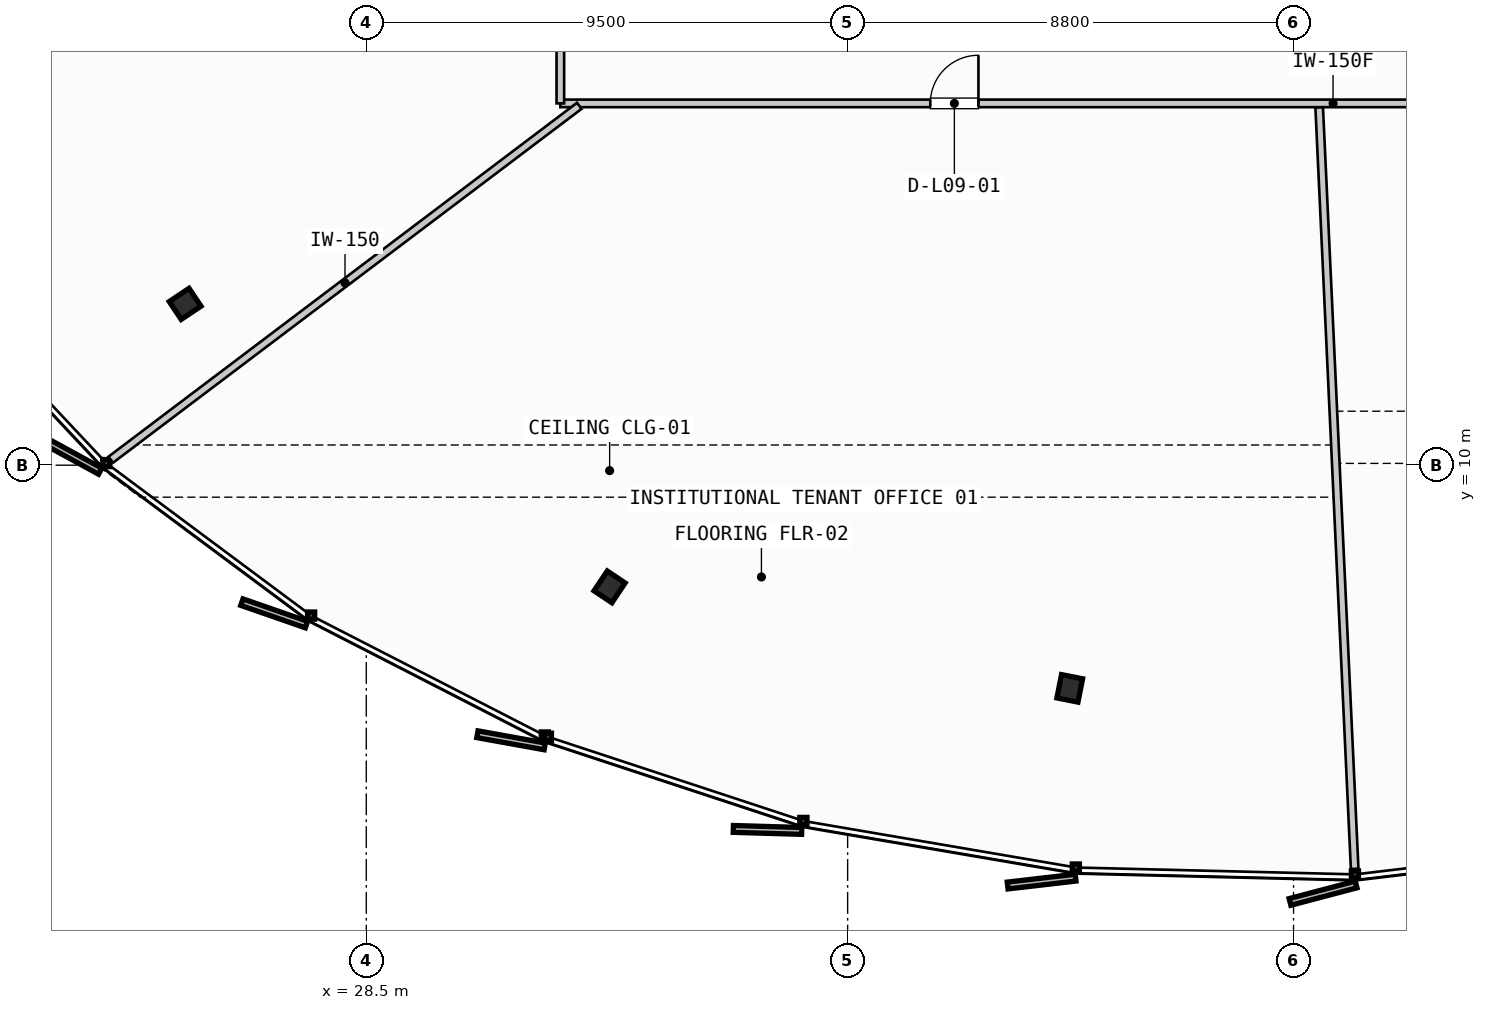
"""IFC4 building model, lengths in metres.
Left out: names, types, materials, properties, quantities, classifications, styles, units other than length and angle.
Written with IfcOpenShell. Run it as: python <this file> out.ifc"""

import sys

from ifc_helpers import new_model, si_unit, direction, frame, frame_2d, origin, origin_2d, place, context, subcontext, project, spatial, rectangle, i_section, extrude, source, transform, mapped, element, fill, save


model = new_model("IFC4")
c1 = context("Model", 3, precision=1e-05, world=origin(), true_north=direction((0.0, 1.0)))
c2 = subcontext(c1, "Body", "Model", "MODEL_VIEW")
j1 = project(units=[si_unit("LENGTHUNIT", "METRE"), si_unit("PLANEANGLEUNIT", "RADIAN")], contexts=[c1])
p1 = place(None, origin())
s1 = spatial("IfcSite", under=j1, at=p1, CompositionType="ELEMENT")
p2 = place(p1, origin())
s2 = spatial("IfcBuilding", under=s1, at=p2, CompositionType="ELEMENT")
p3 = place(p2, frame((0.0, 0.0, 41.0)))
s3 = spatial("IfcBuildingStorey", under=s2, at=p3, CompositionType="ELEMENT", Elevation=41.0)
m1 = source(origin(), c2, "Body", "SweptSolid", [
    extrude(i_section(OverallWidth=0.423, OverallDepth=0.469, WebThickness=0.051, FlangeThickness=0.081, FilletRadius=0.015, at=origin_2d()), origin(), (0.0, 0.0, 1.0), 3.55),
])
for number, where, z_axis, x_axis in (
    (1, (24.925, 13.183, 0.0), (0.0, 0.0, 1.0), (-0.831, -0.556, 0.0)),
    (2, (33.302, 7.599, 0.0), (0.0, 0.0, 1.0), (-0.556, -0.831, 0.0)),
    (3, (42.383, 5.596, 0.0), (0.0, 0.0, 1.0), (-0.195, -0.981, 0.0)),
):
    element("IfcColumn", number, at=place(p3, frame(where, z_axis=z_axis, x_axis=x_axis)), inside=s3, PredefinedType="COLUMN", context=c2, shape_type="MappedRepresentation", body=[
        mapped(m1, transform((0.0, 0.0, 0.0), scale=1.0)),
    ])
p4 = place(p3, frame((32.33, 17.14, 0.0), z_axis=(0.0, 0.0, 1.0), x_axis=(1.0, 0.0, 0.0)))
e4 = element("IfcWall", 4, at=p4, inside=s3, PredefinedType="PARTITIONING", context=c2, shape_type="SweptSolid", body=[
    extrude(rectangle(XDim=30.5, YDim=0.15, at=frame_2d((15.25, 0.0))), origin(), (0.0, 0.0, 1.0), 2.785),
])
p5 = place(p4, frame((7.302, 0.0, 0.0)))
e5 = element("IfcOpeningElement", 5, at=p5, cuts=e4, PredefinedType="OPENING", context=c2, shape_type="SweptSolid", body=[
    extrude(rectangle(XDim=0.95, YDim=2.15, at=frame_2d((0.475, 1.075))), frame((0.0, 0.085, 0.0), z_axis=(0.0, -1.0, 0.0), x_axis=(1.0, 0.0, 0.0)), (0.0, 0.0, 1.0), 0.17),
])
p6 = place(p4, frame((21.971, 0.0, 0.0)))
e6 = element("IfcOpeningElement", 6, at=p6, cuts=e4, PredefinedType="OPENING", context=c2, shape_type="SweptSolid", body=[
    extrude(rectangle(XDim=0.95, YDim=2.15, at=frame_2d((0.475, 1.075))), frame((0.0, 0.085, 0.0), z_axis=(0.0, -1.0, 0.0), x_axis=(1.0, 0.0, 0.0)), (0.0, 0.0, 1.0), 0.17),
])
p7 = place(p3, frame((32.33, 37.62, 0.0), z_axis=(0.0, 0.0, 1.0), x_axis=(0.0, -1.0, 0.0)))
e7 = element("IfcWall", 7, at=p7, inside=s3, PredefinedType="PARTITIONING", context=c2, shape_type="SweptSolid", body=[
    extrude(rectangle(XDim=20.48, YDim=0.15, at=frame_2d((10.24, 0.0))), origin(), (0.0, 0.0, 1.0), 2.785),
])
p8 = place(p7, frame((9.765, 0.0, 0.0)))
e8 = element("IfcOpeningElement", 8, at=p8, cuts=e7, PredefinedType="OPENING", context=c2, shape_type="SweptSolid", body=[
    extrude(rectangle(XDim=0.95, YDim=2.15, at=frame_2d((0.475, 1.075))), frame((0.0, 0.085, 0.0), z_axis=(0.0, -1.0, 0.0), x_axis=(1.0, 0.0, 0.0)), (0.0, 0.0, 1.0), 0.17),
])
p9 = place(p3, frame((32.704, 17.092, 0.0), z_axis=(0.0, 0.0, 1.0), x_axis=(-0.797998359946, -0.602659619954, 0.0)))
e9 = element("IfcWall", 9, at=p9, inside=s3, PredefinedType="PARTITIONING", context=c2, shape_type="SweptSolid", body=[
    extrude(rectangle(XDim=11.588, YDim=0.15, at=frame_2d((5.794, 0.0))), origin(), (0.0, 0.0, 1.0), 2.785),
])
p10 = place(p3, frame((47.306, 17.06, 0.0), z_axis=(0.0, 0.0, 1.0), x_axis=(0.046548778798, -0.998916018088, 0.0)))
e10 = element("IfcWall", 10, at=p10, inside=s3, PredefinedType="PARTITIONING", context=c2, shape_type="SweptSolid", body=[
    extrude(rectangle(XDim=15.042, YDim=0.15, at=frame_2d((7.521, 0.0))), origin(), (0.0, 0.0, 1.0), 2.785),
])
m2 = source(origin(), c2, "Body", "SweptSolid", [
    extrude(rectangle(XDim=0.95, YDim=2.15, at=frame_2d((0.475, 1.075))), frame((0.0, 0.025, 0.0), z_axis=(0.0, -1.0, 0.0), x_axis=(1.0, 0.0, 0.0)), (0.0, 0.0, 1.0), 0.05),
])
p11 = place(p5, origin())
e11 = element("IfcDoor", 11, at=p11, inside=s3, OperationType="SINGLE_SWING_RIGHT", PredefinedType="DOOR", context=c2, shape_type="MappedRepresentation", body=[
    mapped(m2, transform((0.0, 0.0, 0.0), scale=1.0)),
])
fill(e5, e11)
save(model, sys.argv[1])
